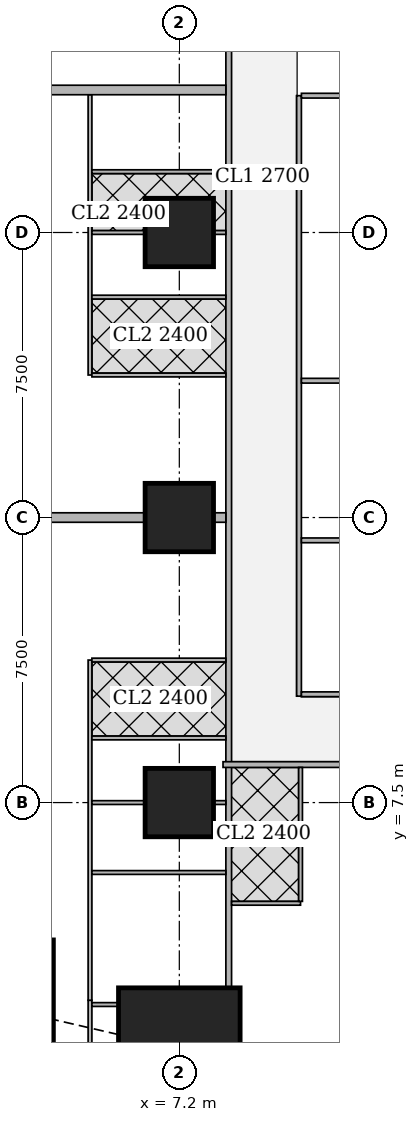
"""IFC4 building model, lengths in metres.
Left out: names, types, materials, properties, quantities, classifications, styles, units other than length and angle.
Written with IfcOpenShell. Run it as: python <this file> out.ifc"""

import sys

from ifc_helpers import new_model, si_unit, direction, frame, frame_2d, origin, origin_2d, place, context, subcontext, project, spatial, rectangle, extrude, element, fill, save


model = new_model("IFC4")
c1 = context("Model", 3, precision=1e-05, world=origin(), true_north=direction((0.0, 1.0)))
c2 = subcontext(c1, "Body", "Model", "MODEL_VIEW")
j1 = project(units=[si_unit("LENGTHUNIT", "METRE"), si_unit("PLANEANGLEUNIT", "RADIAN")], contexts=[c1])
p1 = place(None, origin())
s1 = spatial("IfcSite", under=j1, at=p1, CompositionType="ELEMENT")
p2 = place(p1, origin())
s2 = spatial("IfcBuilding", under=s1, at=p2, CompositionType="ELEMENT")
p3 = place(p2, frame((0.0, 0.0, 20.0)))
s3 = spatial("IfcBuildingStorey", under=s2, at=p3, CompositionType="ELEMENT", Elevation=20.0)
p4 = place(p3, frame((7.2, 1.025, -0.3), z_axis=(0.0, 0.0, 1.0), x_axis=(1.0, 0.0, 0.0)))
e1 = element("IfcColumn", 1, at=p4, inside=s3, PredefinedType="COLUMN", context=c2, shape_type="SweptSolid", body=[
    extrude(rectangle(XDim=3.2, YDim=3.2, at=origin_2d()), origin(), (0.0, 0.0, 1.0), 4.05),
])
p5 = place(p3, frame((2.186, 2.186, 0.0), z_axis=(0.0, 0.0, 1.0), x_axis=(1.0, 0.0, 0.0)))
e2 = element("IfcColumn", 2, at=p5, inside=s3, PredefinedType="COLUMN", context=c2, shape_type="SweptSolid", body=[
    extrude(rectangle(XDim=3.4, YDim=3.4, at=origin_2d()), origin(), (0.0, 0.0, 1.0), 3.75),
])
for number, where, z_axis, x_axis in (
    (3, (7.2, 7.5, 0.0), (0.0, 0.0, 1.0), (1.0, 0.0, 0.0)),
    (4, (7.2, 15.0, 0.0), (0.0, 0.0, 1.0), (1.0, 0.0, 0.0)),
    (5, (7.2, 22.5, 0.0), (0.0, 0.0, 1.0), (1.0, 0.0, 0.0)),
):
    element("IfcColumn", number, at=place(p3, frame(where, z_axis=z_axis, x_axis=x_axis)), inside=s3, PredefinedType="COLUMN", context=c2, shape_type="SweptSolid", body=[
        extrude(rectangle(XDim=1.8, YDim=1.8, at=origin_2d()), origin(), (0.0, 0.0, 1.0), 3.75),
    ])
p6 = place(p3, frame((8.5, 2.626, 0.0), z_axis=(0.0, 0.0, 1.0), x_axis=(0.0, 1.0, 0.0)))
e6 = element("IfcWall", 6, at=p6, inside=s3, PredefinedType="SOLIDWALL", context=c2, shape_type="SweptSolid", body=[
    extrude(rectangle(XDim=39.773, YDim=0.15, at=frame_2d((19.886, 0.0))), origin(), (0.0, 0.0, 1.0), 2.05),
])
p7 = place(p6, frame((9.786, 0.0, 0.0)))
e7 = element("IfcOpeningElement", 7, at=p7, cuts=e6, PredefinedType="OPENING", context=c2, shape_type="SweptSolid", body=[
    extrude(rectangle(XDim=1.0, YDim=2.0, at=frame_2d((0.5, 1.0))), frame((0.0, 0.085, 0.0), z_axis=(0.0, -1.0, 0.0), x_axis=(1.0, 0.0, 0.0)), (0.0, 0.0, 1.0), 0.17),
])
p8 = place(p6, frame((13.961, 0.0, 0.0)))
e8 = element("IfcOpeningElement", 8, at=p8, cuts=e6, PredefinedType="OPENING", context=c2, shape_type="SweptSolid", body=[
    extrude(rectangle(XDim=1.0, YDim=2.0, at=frame_2d((0.5, 1.0))), frame((0.0, 0.085, 0.0), z_axis=(0.0, -1.0, 0.0), x_axis=(1.0, 0.0, 0.0)), (0.0, 0.0, 1.0), 0.17),
])
p9 = place(p6, frame((24.787, 0.0, 0.0)))
e9 = element("IfcOpeningElement", 9, at=p9, cuts=e6, PredefinedType="OPENING", context=c2, shape_type="SweptSolid", body=[
    extrude(rectangle(XDim=1.0, YDim=2.0, at=frame_2d((0.5, 1.0))), frame((0.0, 0.085, 0.0), z_axis=(0.0, -1.0, 0.0), x_axis=(1.0, 0.0, 0.0)), (0.0, 0.0, 1.0), 0.17),
])
p10 = place(p6, frame((32.287, 0.0, 0.0)))
e10 = element("IfcOpeningElement", 10, at=p10, cuts=e6, PredefinedType="OPENING", context=c2, shape_type="SweptSolid", body=[
    extrude(rectangle(XDim=1.0, YDim=2.0, at=frame_2d((0.5, 1.0))), frame((0.0, 0.085, 0.0), z_axis=(0.0, -1.0, 0.0), x_axis=(1.0, 0.0, 0.0)), (0.0, 0.0, 1.0), 0.17),
])
p11 = place(p3, frame((40.054, 8.5, 0.0), z_axis=(0.0, 0.0, 1.0), x_axis=(-1.0, 0.0, 0.0)))
e11 = element("IfcWall", 11, at=p11, inside=s3, PredefinedType="SOLIDWALL", context=c2, shape_type="SweptSolid", body=[
    extrude(rectangle(XDim=31.704, YDim=0.15, at=frame_2d((15.852, 0.0))), origin(), (0.0, 0.0, 1.0), 3.5),
])
p12 = place(p11, frame((27.321, 0.0, 0.0)))
e12 = element("IfcOpeningElement", 12, at=p12, cuts=e11, PredefinedType="OPENING", context=c2, shape_type="SweptSolid", body=[
    extrude(rectangle(XDim=1.0, YDim=2.1, at=frame_2d((0.5, 1.05))), frame((0.0, 0.085, 0.0), z_axis=(0.0, -1.0, 0.0), x_axis=(1.0, 0.0, 0.0)), (0.0, 0.0, 1.0), 0.17),
])
p13 = place(p11, frame((23.054, 0.0, 0.0)))
e13 = element("IfcOpeningElement", 13, at=p13, cuts=e11, PredefinedType="OPENING", context=c2, shape_type="SweptSolid", body=[
    extrude(rectangle(XDim=1.0, YDim=2.1, at=frame_2d((0.5, 1.05))), frame((0.0, 0.085, 0.0), z_axis=(0.0, -1.0, 0.0), x_axis=(1.0, 0.0, 0.0)), (0.0, 0.0, 1.0), 0.17),
])
p14 = place(p11, frame((15.754, 0.0, 0.0)))
e14 = element("IfcOpeningElement", 14, at=p14, cuts=e11, PredefinedType="OPENING", context=c2, shape_type="SweptSolid", body=[
    extrude(rectangle(XDim=1.0, YDim=2.1, at=frame_2d((0.5, 1.05))), frame((0.0, 0.085, 0.0), z_axis=(0.0, -1.0, 0.0), x_axis=(1.0, 0.0, 0.0)), (0.0, 0.0, 1.0), 0.17),
])
p15 = place(p11, frame((5.754, 0.0, 0.0)))
e15 = element("IfcOpeningElement", 15, at=p15, cuts=e11, PredefinedType="OPENING", context=c2, shape_type="SweptSolid", body=[
    extrude(rectangle(XDim=1.0, YDim=2.1, at=frame_2d((0.5, 1.05))), frame((0.0, 0.085, 0.0), z_axis=(0.0, -1.0, 0.0), x_axis=(1.0, 0.0, 0.0)), (0.0, 0.0, 1.0), 0.17),
])
p16 = place(p3, frame((4.85, 0.839, 0.0), z_axis=(0.0, 0.0, 1.0), x_axis=(0.0, 1.0, 0.0)))
e16 = element("IfcWall", 16, at=p16, inside=s3, PredefinedType="PARTITIONING", context=c2, shape_type="SweptSolid", body=[
    extrude(rectangle(XDim=1.46, YDim=0.1, at=frame_2d((0.73, 0.0))), origin(), (0.0, 0.0, 1.0), 2.1),
])
p17 = place(p3, frame((4.85, 2.299, 0.0), z_axis=(0.0, 0.0, 1.0), x_axis=(0.0, 1.0, 0.0)))
e17 = element("IfcWall", 17, at=p17, inside=s3, PredefinedType="PARTITIONING", context=c2, shape_type="SweptSolid", body=[
    extrude(rectangle(XDim=8.951, YDim=0.1, at=frame_2d((4.476, 0.0))), origin(), (0.0, 0.0, 1.0), 3.5),
])
p18 = place(p17, frame((7.476, 0.0, 0.0)))
e18 = element("IfcOpeningElement", 18, at=p18, cuts=e17, PredefinedType="OPENING", context=c2, shape_type="SweptSolid", body=[
    extrude(rectangle(XDim=0.9, YDim=2.1, at=frame_2d((0.45, 1.05))), frame((0.0, 0.06, 0.0), z_axis=(0.0, -1.0, 0.0), x_axis=(1.0, 0.0, 0.0)), (0.0, 0.0, 1.0), 0.12),
])
p19 = place(p17, frame((3.831, 0.0, 0.0)))
e19 = element("IfcOpeningElement", 19, at=p19, cuts=e17, PredefinedType="OPENING", context=c2, shape_type="SweptSolid", body=[
    extrude(rectangle(XDim=0.9, YDim=2.1, at=frame_2d((0.45, 1.05))), frame((0.0, 0.06, 0.0), z_axis=(0.0, -1.0, 0.0), x_axis=(1.0, 0.0, 0.0)), (0.0, 0.0, 1.0), 0.12),
])
p20 = place(p17, frame((5.601, 0.0, 0.0)))
e20 = element("IfcOpeningElement", 20, at=p20, cuts=e17, PredefinedType="OPENING", context=c2, shape_type="SweptSolid", body=[
    extrude(rectangle(XDim=0.9, YDim=2.1, at=frame_2d((0.45, 1.05))), frame((0.0, 0.06, 0.0), z_axis=(0.0, -1.0, 0.0), x_axis=(1.0, 0.0, 0.0)), (0.0, 0.0, 1.0), 0.12),
])
p21 = place(p17, frame((1.6, 0.0, 0.0)))
e21 = element("IfcOpeningElement", 21, at=p21, cuts=e17, PredefinedType="OPENING", context=c2, shape_type="SweptSolid", body=[
    extrude(rectangle(XDim=0.9, YDim=2.1, at=frame_2d((0.45, 1.05))), frame((0.0, 0.06, 0.0), z_axis=(0.0, -1.0, 0.0), x_axis=(1.0, 0.0, 0.0)), (0.0, 0.0, 1.0), 0.12),
])
p22 = place(p3, frame((4.9, 2.186, 0.0), z_axis=(0.0, 0.0, 1.0), x_axis=(1.0, 0.0, 0.0)))
e22 = element("IfcWall", 22, at=p22, inside=s3, PredefinedType="PARTITIONING", context=c2, shape_type="SweptSolid", body=[
    extrude(rectangle(XDim=0.699, YDim=0.1, at=frame_2d((0.35, 0.0))), origin(), (0.0, 0.0, 1.0), 2.1),
])
p23 = place(p3, frame((4.9, 7.5, 0.0), z_axis=(0.0, 0.0, 1.0), x_axis=(1.0, 0.0, 0.0)))
e23 = element("IfcWall", 23, at=p23, inside=s3, PredefinedType="PARTITIONING", context=c2, shape_type="SweptSolid", body=[
    extrude(rectangle(XDim=1.399, YDim=0.1, at=frame_2d((0.7, 0.0))), origin(), (0.0, 0.0, 1.0), 3.5),
])
p24 = place(p3, frame((8.101, 7.5, 0.0), z_axis=(0.0, 0.0, 1.0), x_axis=(1.0, 0.0, 0.0)))
e24 = element("IfcWall", 24, at=p24, inside=s3, PredefinedType="PARTITIONING", context=c2, shape_type="SweptSolid", body=[
    extrude(rectangle(XDim=0.324, YDim=0.1, at=frame_2d((0.162, 0.0))), origin(), (0.0, 0.0, 1.0), 3.5),
])
for number, where, z_axis, x_axis in (
    (25, (4.9, 11.25, 0.0), (0.0, 0.0, 1.0), (1.0, 0.0, 0.0)),
    (26, (4.9, 9.2, 0.0), (0.0, 0.0, 1.0), (1.0, 0.0, 0.0)),
    (27, (4.9, 5.66, 0.0), (0.0, 0.0, 1.0), (1.0, 0.0, 0.0)),
):
    element("IfcWall", number, at=place(p3, frame(where, z_axis=z_axis, x_axis=x_axis)), inside=s3, PredefinedType="PARTITIONING", context=c2, shape_type="SweptSolid", body=[
        extrude(rectangle(XDim=3.525, YDim=0.1, at=frame_2d((1.763, 0.0))), origin(), (0.0, 0.0, 1.0), 3.5),
    ])
p25 = place(p3, frame((4.85, 18.75, 0.0), z_axis=(0.0, 0.0, 1.0), x_axis=(0.0, 1.0, 0.0)))
e28 = element("IfcWall", 28, at=p25, inside=s3, PredefinedType="PARTITIONING", context=c2, shape_type="SweptSolid", body=[
    extrude(rectangle(XDim=7.375, YDim=0.1, at=frame_2d((3.688, 0.0))), origin(), (0.0, 0.0, 1.0), 3.5),
])
p26 = place(p25, frame((0.575, 0.0, 0.0)))
e29 = element("IfcOpeningElement", 29, at=p26, cuts=e28, PredefinedType="OPENING", context=c2, shape_type="SweptSolid", body=[
    extrude(rectangle(XDim=0.9, YDim=2.1, at=frame_2d((0.45, 1.05))), frame((0.0, 0.06, 0.0), z_axis=(0.0, -1.0, 0.0), x_axis=(1.0, 0.0, 0.0)), (0.0, 0.0, 1.0), 0.12),
])
p27 = place(p25, frame((4.1, 0.0, 0.0)))
e30 = element("IfcOpeningElement", 30, at=p27, cuts=e28, PredefinedType="OPENING", context=c2, shape_type="SweptSolid", body=[
    extrude(rectangle(XDim=0.9, YDim=2.1, at=frame_2d((0.45, 1.05))), frame((0.0, 0.06, 0.0), z_axis=(0.0, -1.0, 0.0), x_axis=(1.0, 0.0, 0.0)), (0.0, 0.0, 1.0), 0.12),
])
p28 = place(p25, frame((2.45, 0.0, 0.0)))
e31 = element("IfcOpeningElement", 31, at=p28, cuts=e28, PredefinedType="OPENING", context=c2, shape_type="SweptSolid", body=[
    extrude(rectangle(XDim=0.9, YDim=2.1, at=frame_2d((0.45, 1.05))), frame((0.0, 0.06, 0.0), z_axis=(0.0, -1.0, 0.0), x_axis=(1.0, 0.0, 0.0)), (0.0, 0.0, 1.0), 0.12),
])
p29 = place(p25, frame((5.975, 0.0, 0.0)))
e32 = element("IfcOpeningElement", 32, at=p29, cuts=e28, PredefinedType="OPENING", context=c2, shape_type="SweptSolid", body=[
    extrude(rectangle(XDim=0.9, YDim=2.1, at=frame_2d((0.45, 1.05))), frame((0.0, 0.06, 0.0), z_axis=(0.0, -1.0, 0.0), x_axis=(1.0, 0.0, 0.0)), (0.0, 0.0, 1.0), 0.12),
])
p30 = place(p3, frame((4.9, 18.75, 0.0), z_axis=(0.0, 0.0, 1.0), x_axis=(1.0, 0.0, 0.0)))
e33 = element("IfcWall", 33, at=p30, inside=s3, PredefinedType="PARTITIONING", context=c2, shape_type="SweptSolid", body=[
    extrude(rectangle(XDim=3.525, YDim=0.1, at=frame_2d((1.763, 0.0))), origin(), (0.0, 0.0, 1.0), 3.5),
])
p31 = place(p3, frame((4.9, 22.5, 0.0), z_axis=(0.0, 0.0, 1.0), x_axis=(1.0, 0.0, 0.0)))
e34 = element("IfcWall", 34, at=p31, inside=s3, PredefinedType="PARTITIONING", context=c2, shape_type="SweptSolid", body=[
    extrude(rectangle(XDim=1.399, YDim=0.1, at=frame_2d((0.7, 0.0))), origin(), (0.0, 0.0, 1.0), 3.5),
])
p32 = place(p3, frame((8.101, 22.5, 0.0), z_axis=(0.0, 0.0, 1.0), x_axis=(1.0, 0.0, 0.0)))
e35 = element("IfcWall", 35, at=p32, inside=s3, PredefinedType="PARTITIONING", context=c2, shape_type="SweptSolid", body=[
    extrude(rectangle(XDim=0.324, YDim=0.1, at=frame_2d((0.162, 0.0))), origin(), (0.0, 0.0, 1.0), 3.5),
])
for number, where, z_axis, x_axis in (
    (36, (4.9, 20.8, 0.0), (0.0, 0.0, 1.0), (1.0, 0.0, 0.0)),
    (37, (4.9, 24.1, 0.0), (0.0, 0.0, 1.0), (1.0, 0.0, 0.0)),
):
    element("IfcWall", number, at=place(p3, frame(where, z_axis=z_axis, x_axis=x_axis)), inside=s3, PredefinedType="PARTITIONING", context=c2, shape_type="SweptSolid", body=[
        extrude(rectangle(XDim=3.525, YDim=0.1, at=frame_2d((1.763, 0.0))), origin(), (0.0, 0.0, 1.0), 3.5),
    ])
p33 = place(p3, frame((3.65, 15.0, 0.0), z_axis=(0.0, 0.0, 1.0), x_axis=(1.0, 0.0, 0.0)))
e38 = element("IfcWall", 38, at=p33, inside=s3, PredefinedType="SOLIDWALL", context=c2, shape_type="SweptSolid", body=[
    extrude(rectangle(XDim=2.649, YDim=0.25, at=frame_2d((1.325, 0.0))), origin(), (0.0, 0.0, 1.0), 3.5),
])
p34 = place(p3, frame((8.101, 15.0, 0.0), z_axis=(0.0, 0.0, 1.0), x_axis=(1.0, 0.0, 0.0)))
e39 = element("IfcWall", 39, at=p34, inside=s3, PredefinedType="SOLIDWALL", context=c2, shape_type="SweptSolid", body=[
    extrude(rectangle(XDim=0.324, YDim=0.25, at=frame_2d((0.162, 0.0))), origin(), (0.0, 0.0, 1.0), 3.5),
])
p35 = place(p3, frame((3.65, 26.25, 0.0), z_axis=(0.0, 0.0, 1.0), x_axis=(1.0, 0.0, 0.0)))
e40 = element("IfcWall", 40, at=p35, inside=s3, PredefinedType="SOLIDWALL", context=c2, shape_type="SweptSolid", body=[
    extrude(rectangle(XDim=4.775, YDim=0.25, at=frame_2d((2.388, 0.0))), origin(), (0.0, 0.0, 1.0), 3.5),
])
p36 = place(p3, frame((10.39, 4.85, 0.0), z_axis=(0.0, 0.0, 1.0), x_axis=(-1.0, 0.0, 0.0)))
e41 = element("IfcWall", 41, at=p36, inside=s3, PredefinedType="PARTITIONING", context=c2, shape_type="SweptSolid", body=[
    extrude(rectangle(XDim=1.815, YDim=0.1, at=frame_2d((0.907, 0.0))), origin(), (0.0, 0.0, 1.0), 3.5),
])
p37 = place(p36, frame((0.49, 0.0, 0.0)))
e42 = element("IfcOpeningElement", 42, at=p37, cuts=e41, PredefinedType="OPENING", context=c2, shape_type="SweptSolid", body=[
    extrude(rectangle(XDim=0.9, YDim=2.1, at=frame_2d((0.45, 1.05))), frame((0.0, 0.06, 0.0), z_axis=(0.0, -1.0, 0.0), x_axis=(1.0, 0.0, 0.0)), (0.0, 0.0, 1.0), 0.12),
])
p38 = place(p3, frame((10.39, 4.9, 0.0), z_axis=(0.0, 0.0, 1.0), x_axis=(0.0, 1.0, 0.0)))
e43 = element("IfcWall", 43, at=p38, inside=s3, PredefinedType="PARTITIONING", context=c2, shape_type="SweptSolid", body=[
    extrude(rectangle(XDim=3.525, YDim=0.1, at=frame_2d((1.763, 0.0))), origin(), (0.0, 0.0, 1.0), 3.5),
])
p39 = place(p3, frame((10.35, 10.3, 0.0), z_axis=(0.0, 0.0, 1.0), x_axis=(0.0, 1.0, 0.0)))
e44 = element("IfcWall", 44, at=p39, inside=s3, PredefinedType="PARTITIONING", context=c2, shape_type="SweptSolid", body=[
    extrude(rectangle(XDim=15.8, YDim=0.125, at=frame_2d((7.9, 0.0))), origin(), (0.0, 0.0, 1.0), 3.5),
])
p40 = place(p39, frame((1.55, 0.0, 0.0)))
e45 = element("IfcOpeningElement", 45, at=p40, cuts=e44, PredefinedType="OPENING", context=c2, shape_type="SweptSolid", body=[
    extrude(rectangle(XDim=1.0, YDim=2.1, at=frame_2d((0.5, 1.05))), frame((0.0, 0.073, 0.0), z_axis=(0.0, -1.0, 0.0), x_axis=(1.0, 0.0, 0.0)), (0.0, 0.0, 1.0), 0.145),
])
p41 = place(p39, frame((5.7, 0.0, 0.0)))
e46 = element("IfcOpeningElement", 46, at=p41, cuts=e44, PredefinedType="OPENING", context=c2, shape_type="SweptSolid", body=[
    extrude(rectangle(XDim=1.0, YDim=2.1, at=frame_2d((0.5, 1.05))), frame((0.0, 0.073, 0.0), z_axis=(0.0, -1.0, 0.0), x_axis=(1.0, 0.0, 0.0)), (0.0, 0.0, 1.0), 0.145),
])
p42 = place(p39, frame((11.55, 0.0, 0.0)))
e47 = element("IfcOpeningElement", 47, at=p42, cuts=e44, PredefinedType="OPENING", context=c2, shape_type="SweptSolid", body=[
    extrude(rectangle(XDim=1.0, YDim=2.1, at=frame_2d((0.5, 1.05))), frame((0.0, 0.073, 0.0), z_axis=(0.0, -1.0, 0.0), x_axis=(1.0, 0.0, 0.0)), (0.0, 0.0, 1.0), 0.145),
])
p43 = place(p3, frame((10.413, 14.4, 0.0), z_axis=(0.0, 0.0, 1.0), x_axis=(1.0, 0.0, 0.0)))
e48 = element("IfcWall", 48, at=p43, inside=s3, PredefinedType="PARTITIONING", context=c2, shape_type="SweptSolid", body=[
    extrude(rectangle(XDim=3.475, YDim=0.125, at=frame_2d((1.737, 0.0))), origin(), (0.0, 0.0, 1.0), 3.5),
])
for number, where, z_axis, x_axis in (
    (49, (10.413, 18.6, 0.0), (0.0, 0.0, 1.0), (1.0, 0.0, 0.0)),
    (50, (10.413, 26.1, 0.0), (0.0, 0.0, 1.0), (1.0, 0.0, 0.0)),
):
    element("IfcWall", number, at=place(p3, frame(where, z_axis=z_axis, x_axis=x_axis)), inside=s3, PredefinedType="PARTITIONING", context=c2, shape_type="SweptSolid", body=[
        extrude(rectangle(XDim=3.537, YDim=0.125, at=frame_2d((1.769, 0.0))), origin(), (0.0, 0.0, 1.0), 3.5),
    ])
p44 = place(p3, frame((10.413, 10.35, 0.0), z_axis=(0.0, 0.0, 1.0), x_axis=(1.0, 0.0, 0.0)))
e51 = element("IfcWall", 51, at=p44, inside=s3, PredefinedType="PARTITIONING", context=c2, shape_type="SweptSolid", body=[
    extrude(rectangle(XDim=10.837, YDim=0.125, at=frame_2d((5.418, 0.0))), origin(), (0.0, 0.0, 1.0), 3.5),
])
p45 = place(p44, frame((7.582, 0.0, 0.0)))
e52 = element("IfcOpeningElement", 52, at=p45, cuts=e51, PredefinedType="OPENING", context=c2, shape_type="SweptSolid", body=[
    extrude(rectangle(XDim=1.8, YDim=2.1, at=frame_2d((0.9, 1.05))), frame((0.0, 0.073, 0.0), z_axis=(0.0, -1.0, 0.0), x_axis=(1.0, 0.0, 0.0)), (0.0, 0.0, 1.0), 0.145),
])
p46 = place(p18, origin())
e53 = element("IfcDoor", 53, at=p46, inside=s3, OperationType="SINGLE_SWING_LEFT", PredefinedType="DOOR", context=c2, shape_type="SweptSolid", body=[
    extrude(rectangle(XDim=0.9, YDim=2.1, at=frame_2d((0.45, 1.05))), frame((0.0, 0.025, 0.0), z_axis=(0.0, -1.0, 0.0), x_axis=(1.0, 0.0, 0.0)), (0.0, 0.0, 1.0), 0.05),
])
fill(e18, e53)
p47 = place(p19, origin())
e54 = element("IfcDoor", 54, at=p47, inside=s3, OperationType="SINGLE_SWING_RIGHT", PredefinedType="DOOR", context=c2, shape_type="SweptSolid", body=[
    extrude(rectangle(XDim=0.9, YDim=2.1, at=frame_2d((0.45, 1.05))), frame((0.0, 0.025, 0.0), z_axis=(0.0, -1.0, 0.0), x_axis=(1.0, 0.0, 0.0)), (0.0, 0.0, 1.0), 0.05),
])
fill(e19, e54)
p48 = place(p20, origin())
e55 = element("IfcDoor", 55, at=p48, inside=s3, OperationType="SINGLE_SWING_RIGHT", PredefinedType="DOOR", context=c2, shape_type="SweptSolid", body=[
    extrude(rectangle(XDim=0.9, YDim=2.1, at=frame_2d((0.45, 1.05))), frame((0.0, 0.025, 0.0), z_axis=(0.0, -1.0, 0.0), x_axis=(1.0, 0.0, 0.0)), (0.0, 0.0, 1.0), 0.05),
])
fill(e20, e55)
p49 = place(p21, origin())
e56 = element("IfcDoor", 56, at=p49, inside=s3, OperationType="SINGLE_SWING_LEFT", PredefinedType="DOOR", context=c2, shape_type="SweptSolid", body=[
    extrude(rectangle(XDim=0.9, YDim=2.1, at=frame_2d((0.45, 1.05))), frame((0.0, 0.025, 0.0), z_axis=(0.0, -1.0, 0.0), x_axis=(1.0, 0.0, 0.0)), (0.0, 0.0, 1.0), 0.05),
])
fill(e21, e56)
p50 = place(p7, origin())
e57 = element("IfcDoor", 57, at=p50, inside=s3, OperationType="SINGLE_SWING_LEFT", PredefinedType="DOOR", context=c2, shape_type="SweptSolid", body=[
    extrude(rectangle(XDim=1.0, YDim=2.0, at=frame_2d((0.5, 1.0))), frame((0.0, 0.025, 0.0), z_axis=(0.0, -1.0, 0.0), x_axis=(1.0, 0.0, 0.0)), (0.0, 0.0, 1.0), 0.05),
])
fill(e7, e57)
p51 = place(p26, origin())
e58 = element("IfcDoor", 58, at=p51, inside=s3, OperationType="SINGLE_SWING_RIGHT", PredefinedType="DOOR", context=c2, shape_type="SweptSolid", body=[
    extrude(rectangle(XDim=0.9, YDim=2.1, at=frame_2d((0.45, 1.05))), frame((0.0, 0.025, 0.0), z_axis=(0.0, -1.0, 0.0), x_axis=(1.0, 0.0, 0.0)), (0.0, 0.0, 1.0), 0.05),
])
fill(e29, e58)
p52 = place(p27, origin())
e59 = element("IfcDoor", 59, at=p52, inside=s3, OperationType="SINGLE_SWING_RIGHT", PredefinedType="DOOR", context=c2, shape_type="SweptSolid", body=[
    extrude(rectangle(XDim=0.9, YDim=2.1, at=frame_2d((0.45, 1.05))), frame((0.0, 0.025, 0.0), z_axis=(0.0, -1.0, 0.0), x_axis=(1.0, 0.0, 0.0)), (0.0, 0.0, 1.0), 0.05),
])
fill(e30, e59)
p53 = place(p28, origin())
e60 = element("IfcDoor", 60, at=p53, inside=s3, OperationType="SINGLE_SWING_RIGHT", PredefinedType="DOOR", context=c2, shape_type="SweptSolid", body=[
    extrude(rectangle(XDim=0.9, YDim=2.1, at=frame_2d((0.45, 1.05))), frame((0.0, 0.025, 0.0), z_axis=(0.0, -1.0, 0.0), x_axis=(1.0, 0.0, 0.0)), (0.0, 0.0, 1.0), 0.05),
])
fill(e31, e60)
p54 = place(p29, origin())
e61 = element("IfcDoor", 61, at=p54, inside=s3, OperationType="SINGLE_SWING_LEFT", PredefinedType="DOOR", context=c2, shape_type="SweptSolid", body=[
    extrude(rectangle(XDim=0.9, YDim=2.1, at=frame_2d((0.45, 1.05))), frame((0.0, 0.025, 0.0), z_axis=(0.0, -1.0, 0.0), x_axis=(1.0, 0.0, 0.0)), (0.0, 0.0, 1.0), 0.05),
])
fill(e32, e61)
p55 = place(p8, origin())
e62 = element("IfcDoor", 62, at=p55, inside=s3, OperationType="SINGLE_SWING_RIGHT", PredefinedType="DOOR", context=c2, shape_type="SweptSolid", body=[
    extrude(rectangle(XDim=1.0, YDim=2.0, at=frame_2d((0.5, 1.0))), frame((0.0, 0.025, 0.0), z_axis=(0.0, -1.0, 0.0), x_axis=(1.0, 0.0, 0.0)), (0.0, 0.0, 1.0), 0.05),
])
fill(e8, e62)
p56 = place(p37, origin())
e63 = element("IfcDoor", 63, at=p56, inside=s3, OperationType="SINGLE_SWING_LEFT", PredefinedType="DOOR", context=c2, shape_type="SweptSolid", body=[
    extrude(rectangle(XDim=0.9, YDim=2.1, at=frame_2d((0.45, 1.05))), frame((0.0, 0.025, 0.0), z_axis=(0.0, -1.0, 0.0), x_axis=(1.0, 0.0, 0.0)), (0.0, 0.0, 1.0), 0.05),
])
fill(e42, e63)
p57 = place(p40, origin())
e64 = element("IfcDoor", 64, at=p57, inside=s3, OperationType="SINGLE_SWING_RIGHT", PredefinedType="DOOR", context=c2, shape_type="SweptSolid", body=[
    extrude(rectangle(XDim=1.0, YDim=2.1, at=frame_2d((0.5, 1.05))), frame((0.0, 0.025, 0.0), z_axis=(0.0, -1.0, 0.0), x_axis=(1.0, 0.0, 0.0)), (0.0, 0.0, 1.0), 0.05),
])
fill(e45, e64)
p58 = place(p41, origin())
e65 = element("IfcDoor", 65, at=p58, inside=s3, OperationType="SINGLE_SWING_LEFT", PredefinedType="DOOR", context=c2, shape_type="SweptSolid", body=[
    extrude(rectangle(XDim=1.0, YDim=2.1, at=frame_2d((0.5, 1.05))), frame((0.0, 0.025, 0.0), z_axis=(0.0, -1.0, 0.0), x_axis=(1.0, 0.0, 0.0)), (0.0, 0.0, 1.0), 0.05),
])
fill(e46, e65)
p59 = place(p42, origin())
e66 = element("IfcDoor", 66, at=p59, inside=s3, OperationType="SINGLE_SWING_LEFT", PredefinedType="DOOR", context=c2, shape_type="SweptSolid", body=[
    extrude(rectangle(XDim=1.0, YDim=2.1, at=frame_2d((0.5, 1.05))), frame((0.0, 0.025, 0.0), z_axis=(0.0, -1.0, 0.0), x_axis=(1.0, 0.0, 0.0)), (0.0, 0.0, 1.0), 0.05),
])
fill(e47, e66)
save(model, sys.argv[1])
